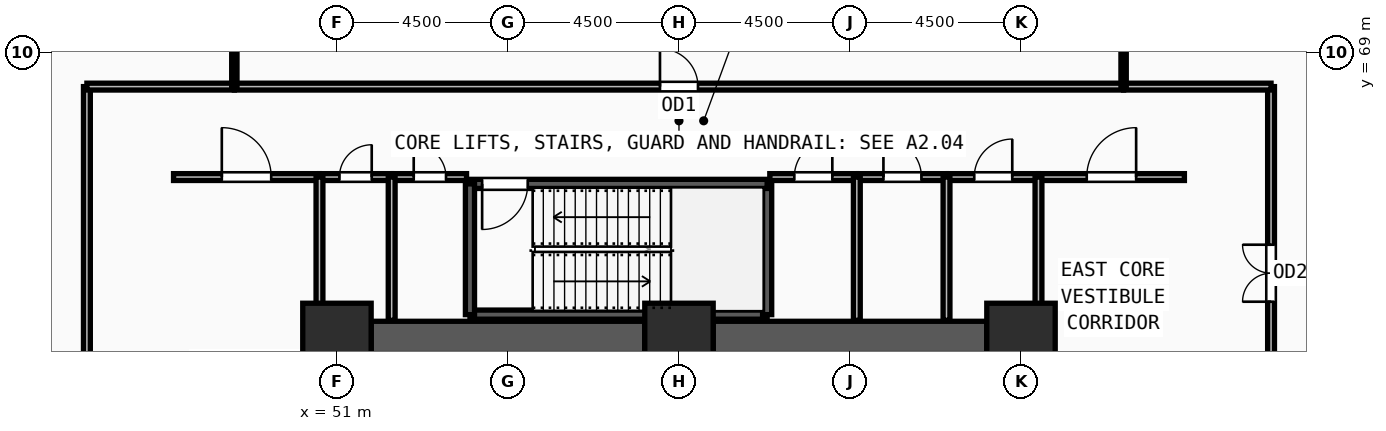
"""IFC4 building model, lengths in metres.
Left out: names, types, materials, properties, quantities, classifications, styles, units other than length and angle.
Written with IfcOpenShell. Run it as: python <this file> out.ifc"""

import sys

from ifc_helpers import new_model, si_unit, direction, frame, frame_2d, origin, origin_2d, place, context, subcontext, project, spatial, rectangle, extrude, source, transform, mapped, element, fill, save


model = new_model("IFC4")
c1 = context("Model", 3, precision=1e-05, world=origin(), true_north=direction((0.0, 1.0)))
c2 = subcontext(c1, "Body", "Model", "MODEL_VIEW")
j1 = project(units=[si_unit("LENGTHUNIT", "METRE"), si_unit("PLANEANGLEUNIT", "RADIAN")], contexts=[c1])
p1 = place(None, origin())
s1 = spatial("IfcSite", under=j1, at=p1, CompositionType="ELEMENT")
p2 = place(p1, origin())
s2 = spatial("IfcBuilding", under=s1, at=p2, CompositionType="ELEMENT")
p3 = place(p2, frame((0.0, 0.0, 9.9)))
s3 = spatial("IfcBuildingStorey", under=s2, at=p3, CompositionType="ELEMENT", Elevation=9.9)
m1 = source(origin(), c2, "Body", "SweptSolid", [
    extrude(rectangle(XDim=1.8, YDim=1.8, at=origin_2d()), origin(), (0.0, 0.0, 1.0), 4.5),
])
for number, where, z_axis, x_axis in (
    (1, (69.0, 61.5, 0.0), (0.0, 0.0, 1.0), (1.0, 0.0, 0.0)),
    (2, (60.0, 61.5, 0.0), (0.0, 0.0, 1.0), (1.0, 0.0, 0.0)),
    (3, (51.0, 61.5, 0.0), (0.0, 0.0, 1.0), (1.0, 0.0, 0.0)),
):
    element("IfcColumn", number, at=place(p3, frame(where, z_axis=z_axis, x_axis=x_axis)), inside=s3, PredefinedType="COLUMN", context=c2, shape_type="MappedRepresentation", body=[
        mapped(m1, transform((0.0, 0.0, 0.0), x_axis=(1.0, 0.0, 0.0), y_axis=(0.0, 1.0, 0.0), z_axis=(0.0, 0.0, 1.0), scale=1.0)),
    ])
for number, where, z_axis, x_axis in (
    (4, (51.9, 61.5, 0.0), (0.0, 0.0, 1.0), (1.0, 0.0, 0.0)),
    (5, (60.9, 61.5, 0.0), (0.0, 0.0, 1.0), (1.0, 0.0, 0.0)),
):
    element("IfcWall", number, at=place(p3, frame(where, z_axis=z_axis, x_axis=x_axis)), inside=s3, PredefinedType="SHEAR", context=c2, shape_type="SweptSolid", body=[
        extrude(rectangle(XDim=7.2, YDim=0.85, at=frame_2d((3.6, 0.0))), origin(), (0.0, 0.0, 1.0), 4.25),
    ])
p4 = place(p3, frame((54.5, 62.1, 0.0), z_axis=(0.0, 0.0, 1.0), x_axis=(1.0, 0.0, 0.0)))
e6 = element("IfcWall", 6, at=p4, inside=s3, PredefinedType="SOLIDWALL", context=c2, shape_type="SweptSolid", body=[
    extrude(rectangle(XDim=7.82, YDim=0.24, at=frame_2d((3.91, 0.0))), origin(), (0.0, 0.0, 1.0), 4.25),
])
p5 = place(p3, frame((62.32, 62.1, 0.0), z_axis=(0.0, 0.0, 1.0), x_axis=(0.0, 1.0, 0.0)))
e7 = element("IfcWall", 7, at=p5, inside=s3, PredefinedType="SOLIDWALL", context=c2, shape_type="SweptSolid", body=[
    extrude(rectangle(XDim=3.44, YDim=0.24, at=frame_2d((1.72, 0.0))), origin(), (0.0, 0.0, 1.0), 4.25),
])
p6 = place(p3, frame((62.32, 65.54, 0.0), z_axis=(0.0, 0.0, 1.0), x_axis=(-1.0, 0.0, 0.0)))
e8 = element("IfcWall", 8, at=p6, inside=s3, PredefinedType="SOLIDWALL", context=c2, shape_type="SweptSolid", body=[
    extrude(rectangle(XDim=7.82, YDim=0.24, at=frame_2d((3.91, 0.0))), origin(), (0.0, 0.0, 1.0), 4.25),
])
m2 = source(origin(), c2, "Body", "SweptSolid", [
    extrude(rectangle(XDim=1.2, YDim=2.2, at=frame_2d((0.6, 1.1))), frame((0.0, 0.13, 0.0), z_axis=(0.0, -1.0, 0.0), x_axis=(1.0, 0.0, 0.0)), (0.0, 0.0, 1.0), 0.26),
])
p7 = place(p6, frame((6.3, 0.0, 0.0)))
e9 = element("IfcOpeningElement", 9, at=p7, cuts=e8, PredefinedType="OPENING", context=c2, shape_type="MappedRepresentation", body=[
    mapped(m2, transform((0.0, 0.0, 0.0), x_axis=(1.0, 0.0, 0.0), y_axis=(0.0, 1.0, 0.0), z_axis=(0.0, 0.0, 1.0), scale=1.0)),
])
p8 = place(p3, frame((54.5, 65.54, 0.0), z_axis=(0.0, 0.0, 1.0), x_axis=(0.0, -1.0, 0.0)))
e10 = element("IfcWall", 10, at=p8, inside=s3, PredefinedType="SOLIDWALL", context=c2, shape_type="SweptSolid", body=[
    extrude(rectangle(XDim=3.44, YDim=0.24, at=frame_2d((1.72, 0.0))), origin(), (0.0, 0.0, 1.0), 4.25),
])
p9 = place(p3, frame((50.54, 65.72, 0.0), z_axis=(0.0, 0.0, 1.0), x_axis=(1.0, 0.0, 0.0)))
e11 = element("IfcWall", 11, at=p9, inside=s3, PredefinedType="PARTITIONING", context=c2, shape_type="SweptSolid", body=[
    extrude(rectangle(XDim=1.9, YDim=0.18, at=frame_2d((0.95, 0.0))), origin(), (0.0, 0.0, 1.0), 4.25),
])
m3 = source(origin(), c2, "Body", "SweptSolid", [
    extrude(rectangle(XDim=0.85, YDim=2.1, at=frame_2d((0.425, 1.05))), frame((0.0, 0.1, 0.0), z_axis=(0.0, -1.0, 0.0), x_axis=(1.0, 0.0, 0.0)), (0.0, 0.0, 1.0), 0.2),
])
p10 = place(p9, frame((0.525, 0.0, 0.0)))
e12 = element("IfcOpeningElement", 12, at=p10, cuts=e11, PredefinedType="OPENING", context=c2, shape_type="MappedRepresentation", body=[
    mapped(m3, transform((0.0, 0.0, 0.0), x_axis=(1.0, 0.0, 0.0), y_axis=(0.0, 1.0, 0.0), z_axis=(0.0, 0.0, 1.0), scale=1.0)),
])
p11 = place(p3, frame((52.48, 65.72, 0.0), z_axis=(0.0, 0.0, 1.0), x_axis=(1.0, 0.0, 0.0)))
e13 = element("IfcWall", 13, at=p11, inside=s3, PredefinedType="PARTITIONING", context=c2, shape_type="SweptSolid", body=[
    extrude(rectangle(XDim=1.93, YDim=0.18, at=frame_2d((0.965, 0.0))), origin(), (0.0, 0.0, 1.0), 4.25),
])
p12 = place(p11, frame((0.54, 0.0, 0.0)))
e14 = element("IfcOpeningElement", 14, at=p12, cuts=e13, PredefinedType="OPENING", context=c2, shape_type="MappedRepresentation", body=[
    mapped(m3, transform((0.0, 0.0, 0.0), x_axis=(1.0, 0.0, 0.0), y_axis=(0.0, 1.0, 0.0), z_axis=(0.0, 0.0, 1.0), scale=1.0)),
])
p13 = place(p3, frame((62.39, 65.72, 0.0), z_axis=(0.0, 0.0, 1.0), x_axis=(1.0, 0.0, 0.0)))
e15 = element("IfcWall", 15, at=p13, inside=s3, PredefinedType="PARTITIONING", context=c2, shape_type="SweptSolid", body=[
    extrude(rectangle(XDim=2.29, YDim=0.18, at=frame_2d((1.145, 0.0))), origin(), (0.0, 0.0, 1.0), 4.25),
])
m4 = source(origin(), c2, "Body", "SweptSolid", [
    extrude(rectangle(XDim=1.0, YDim=2.2, at=frame_2d((0.5, 1.1))), frame((0.0, 0.1, 0.0), z_axis=(0.0, -1.0, 0.0), x_axis=(1.0, 0.0, 0.0)), (0.0, 0.0, 1.0), 0.2),
])
p14 = place(p13, frame((0.645, 0.0, 0.0)))
e16 = element("IfcOpeningElement", 16, at=p14, cuts=e15, PredefinedType="OPENING", context=c2, shape_type="MappedRepresentation", body=[
    mapped(m4, transform((0.0, 0.0, 0.0), x_axis=(1.0, 0.0, 0.0), y_axis=(0.0, 1.0, 0.0), z_axis=(0.0, 0.0, 1.0), scale=1.0)),
])
p15 = place(p3, frame((64.72, 65.72, 0.0), z_axis=(0.0, 0.0, 1.0), x_axis=(1.0, 0.0, 0.0)))
e17 = element("IfcWall", 17, at=p15, inside=s3, PredefinedType="PARTITIONING", context=c2, shape_type="SweptSolid", body=[
    extrude(rectangle(XDim=2.32, YDim=0.18, at=frame_2d((1.16, 0.0))), origin(), (0.0, 0.0, 1.0), 4.25),
])
p16 = place(p15, frame((0.66, 0.0, 0.0)))
e18 = element("IfcOpeningElement", 18, at=p16, cuts=e17, PredefinedType="OPENING", context=c2, shape_type="MappedRepresentation", body=[
    mapped(m4, transform((0.0, 0.0, 0.0), x_axis=(1.0, 0.0, 0.0), y_axis=(0.0, 1.0, 0.0), z_axis=(0.0, 0.0, 1.0), scale=1.0)),
])
p17 = place(p3, frame((67.08, 65.72, 0.0), z_axis=(0.0, 0.0, 1.0), x_axis=(1.0, 0.0, 0.0)))
e19 = element("IfcWall", 19, at=p17, inside=s3, PredefinedType="PARTITIONING", context=c2, shape_type="SweptSolid", body=[
    extrude(rectangle(XDim=2.38, YDim=0.18, at=frame_2d((1.19, 0.0))), origin(), (0.0, 0.0, 1.0), 4.25),
])
p18 = place(p17, frame((0.69, 0.0, 0.0)))
e20 = element("IfcOpeningElement", 20, at=p18, cuts=e19, PredefinedType="OPENING", context=c2, shape_type="MappedRepresentation", body=[
    mapped(m4, transform((0.0, 0.0, 0.0), x_axis=(1.0, 0.0, 0.0), y_axis=(0.0, 1.0, 0.0), z_axis=(0.0, 0.0, 1.0), scale=1.0)),
])
p19 = place(p3, frame((46.7, 65.72, 0.0), z_axis=(0.0, 0.0, 1.0), x_axis=(1.0, 0.0, 0.0)))
e21 = element("IfcWall", 21, at=p19, inside=s3, PredefinedType="PARTITIONING", context=c2, shape_type="SweptSolid", body=[
    extrude(rectangle(XDim=3.84, YDim=0.18, at=frame_2d((1.92, 0.0))), origin(), (0.0, 0.0, 1.0), 4.25),
])
m5 = source(origin(), c2, "Body", "SweptSolid", [
    extrude(rectangle(XDim=1.3, YDim=2.2, at=frame_2d((0.65, 1.1))), frame((0.0, 0.1, 0.0), z_axis=(0.0, -1.0, 0.0), x_axis=(1.0, 0.0, 0.0)), (0.0, 0.0, 1.0), 0.2),
])
p20 = place(p19, frame((1.27, 0.0, 0.0)))
e22 = element("IfcOpeningElement", 22, at=p20, cuts=e21, PredefinedType="OPENING", context=c2, shape_type="MappedRepresentation", body=[
    mapped(m5, transform((0.0, 0.0, 0.0), x_axis=(1.0, 0.0, 0.0), y_axis=(0.0, 1.0, 0.0), z_axis=(0.0, 0.0, 1.0), scale=1.0)),
])
p21 = place(p3, frame((69.46, 65.72, 0.0), z_axis=(0.0, 0.0, 1.0), x_axis=(1.0, 0.0, 0.0)))
e23 = element("IfcWall", 23, at=p21, inside=s3, PredefinedType="PARTITIONING", context=c2, shape_type="SweptSolid", body=[
    extrude(rectangle(XDim=3.84, YDim=0.18, at=frame_2d((1.92, 0.0))), origin(), (0.0, 0.0, 1.0), 4.25),
])
p22 = place(p21, frame((1.27, 0.0, 0.0)))
e24 = element("IfcOpeningElement", 24, at=p22, cuts=e23, PredefinedType="OPENING", context=c2, shape_type="MappedRepresentation", body=[
    mapped(m5, transform((0.0, 0.0, 0.0), x_axis=(1.0, 0.0, 0.0), y_axis=(0.0, 1.0, 0.0), z_axis=(0.0, 0.0, 1.0), scale=1.0)),
])
p23 = place(p3, frame((44.42, 46.1, 0.0), z_axis=(0.0, 0.0, 1.0), x_axis=(0.0, 1.0, 0.0)))
e25 = element("IfcWall", 25, at=p23, inside=s3, PredefinedType="PARTITIONING", context=c2, shape_type="SweptSolid", body=[
    extrude(rectangle(XDim=22.0, YDim=0.18, at=frame_2d((11.0, 0.0))), origin(), (0.0, 0.0, 1.0), 4.25),
])
m6 = source(origin(), c2, "Body", "SweptSolid", [
    extrude(rectangle(XDim=1.5, YDim=2.2, at=frame_2d((0.75, 1.1))), frame((0.0, 0.1, 0.0), z_axis=(0.0, -1.0, 0.0), x_axis=(1.0, 0.0, 0.0)), (0.0, 0.0, 1.0), 0.2),
])
p24 = place(p23, frame((10.25, 0.0, 0.0)))
e26 = element("IfcOpeningElement", 26, at=p24, cuts=e25, PredefinedType="OPENING", context=c2, shape_type="MappedRepresentation", body=[
    mapped(m6, transform((0.0, 0.0, 0.0), x_axis=(1.0, 0.0, 0.0), y_axis=(0.0, 1.0, 0.0), z_axis=(0.0, 0.0, 1.0), scale=1.0)),
])
p25 = place(p3, frame((75.58, 58.28, 0.0), z_axis=(0.0, 0.0, 1.0), x_axis=(0.0, 1.0, 0.0)))
e27 = element("IfcWall", 27, at=p25, inside=s3, PredefinedType="PARTITIONING", context=c2, shape_type="SweptSolid", body=[
    extrude(rectangle(XDim=9.82, YDim=0.18, at=frame_2d((4.91, 0.0))), origin(), (0.0, 0.0, 1.0), 4.25),
])
p26 = place(p25, frame((4.16, 0.0, 0.0)))
e28 = element("IfcOpeningElement", 28, at=p26, cuts=e27, PredefinedType="OPENING", context=c2, shape_type="MappedRepresentation", body=[
    mapped(m6, transform((0.0, 0.0, 0.0), x_axis=(1.0, 0.0, 0.0), y_axis=(0.0, 1.0, 0.0), z_axis=(0.0, 0.0, 1.0), scale=1.0)),
])
p27 = place(p3, frame((48.3, 68.1, 0.0), z_axis=(0.0, 0.0, 1.0), x_axis=(1.0, 0.0, 0.0)))
e29 = element("IfcWall", 29, at=p27, inside=s3, PredefinedType="PARTITIONING", context=c2, shape_type="SweptSolid", body=[
    extrude(rectangle(XDim=23.4, YDim=0.18, at=frame_2d((11.7, 0.0))), origin(), (0.0, 0.0, 1.0), 4.25),
])
p28 = place(p27, frame((11.2, 0.0, 0.0)))
e30 = element("IfcOpeningElement", 30, at=p28, cuts=e29, PredefinedType="OPENING", context=c2, shape_type="MappedRepresentation", body=[
    mapped(m4, transform((0.0, 0.0, 0.0), x_axis=(1.0, 0.0, 0.0), y_axis=(0.0, 1.0, 0.0), z_axis=(0.0, 0.0, 1.0), scale=1.0)),
])
for number, where, z_axis, x_axis in (
    (31, (44.42, 68.1, 0.0), (0.0, 0.0, 1.0), (1.0, 0.0, 0.0)),
    (32, (71.7, 68.1, 0.0), (0.0, 0.0, 1.0), (1.0, 0.0, 0.0)),
):
    element("IfcWall", number, at=place(p3, frame(where, z_axis=z_axis, x_axis=x_axis)), inside=s3, PredefinedType="PARTITIONING", context=c2, shape_type="SweptSolid", body=[
        extrude(rectangle(XDim=3.88, YDim=0.18, at=frame_2d((1.94, 0.0))), origin(), (0.0, 0.0, 1.0), 4.25),
    ])
for number, where, z_axis, x_axis in (
    (33, (48.3, 68.1, 0.0), (0.0, 0.0, 1.0), (0.0, 1.0, 0.0)),
    (34, (71.7, 68.1, 0.0), (0.0, 0.0, 1.0), (0.0, 1.0, 0.0)),
):
    element("IfcWall", number, at=place(p3, frame(where, z_axis=z_axis, x_axis=x_axis)), inside=s3, PredefinedType="PARTITIONING", context=c2, shape_type="SweptSolid", body=[
        extrude(rectangle(XDim=18.675, YDim=0.14, at=frame_2d((9.337, 0.0))), origin(), (0.0, 0.0, 1.0), 4.25),
    ])
for number, where, z_axis, x_axis in (
    (35, (50.54, 61.95, 0.0), (0.0, 0.0, 1.0), (0.0, 1.0, 0.0)),
    (36, (52.44, 61.95, 0.0), (0.0, 0.0, 1.0), (0.0, 1.0, 0.0)),
    (37, (64.68, 61.95, 0.0), (0.0, 0.0, 1.0), (0.0, 1.0, 0.0)),
    (38, (67.04, 61.95, 0.0), (0.0, 0.0, 1.0), (0.0, 1.0, 0.0)),
    (39, (69.46, 61.95, 0.0), (0.0, 0.0, 1.0), (0.0, 1.0, 0.0)),
):
    element("IfcWall", number, at=place(p3, frame(where, z_axis=z_axis, x_axis=x_axis)), inside=s3, PredefinedType="PARTITIONING", context=c2, shape_type="SweptSolid", body=[
        extrude(rectangle(XDim=3.77, YDim=0.18, at=frame_2d((1.885, 0.0))), origin(), (0.0, 0.0, 1.0), 4.25),
    ])
m7 = source(origin(), c2, "Body", "SweptSolid", [
    extrude(rectangle(XDim=1.2, YDim=2.2, at=frame_2d((0.6, 1.1))), frame((0.0, 0.025, 0.0), z_axis=(0.0, -1.0, 0.0), x_axis=(1.0, 0.0, 0.0)), (0.0, 0.0, 1.0), 0.05),
])
p29 = place(p7, origin())
e40 = element("IfcDoor", 40, at=p29, inside=s3, OperationType="SINGLE_SWING_RIGHT", PredefinedType="DOOR", context=c2, shape_type="MappedRepresentation", body=[
    mapped(m7, transform((0.0, 0.0, 0.0), x_axis=(1.0, 0.0, 0.0), y_axis=(0.0, 1.0, 0.0), z_axis=(0.0, 0.0, 1.0), scale=1.0)),
])
fill(e9, e40)
m8 = source(origin(), c2, "Body", "SweptSolid", [
    extrude(rectangle(XDim=0.85, YDim=2.1, at=frame_2d((0.425, 1.05))), frame((0.0, 0.025, 0.0), z_axis=(0.0, -1.0, 0.0), x_axis=(1.0, 0.0, 0.0)), (0.0, 0.0, 1.0), 0.05),
])
p30 = place(p10, origin())
e41 = element("IfcDoor", 41, at=p30, inside=s3, OperationType="SINGLE_SWING_RIGHT", PredefinedType="DOOR", context=c2, shape_type="MappedRepresentation", body=[
    mapped(m8, transform((0.0, 0.0, 0.0), x_axis=(1.0, 0.0, 0.0), y_axis=(0.0, 1.0, 0.0), z_axis=(0.0, 0.0, 1.0), scale=1.0)),
])
fill(e12, e41)
p31 = place(p12, origin())
e42 = element("IfcDoor", 42, at=p31, inside=s3, OperationType="SINGLE_SWING_LEFT", PredefinedType="DOOR", context=c2, shape_type="MappedRepresentation", body=[
    mapped(m8, transform((0.0, 0.0, 0.0), x_axis=(1.0, 0.0, 0.0), y_axis=(0.0, 1.0, 0.0), z_axis=(0.0, 0.0, 1.0), scale=1.0)),
])
fill(e14, e42)
m9 = source(origin(), c2, "Body", "SweptSolid", [
    extrude(rectangle(XDim=1.0, YDim=2.2, at=frame_2d((0.5, 1.1))), frame((0.0, 0.025, 0.0), z_axis=(0.0, -1.0, 0.0), x_axis=(1.0, 0.0, 0.0)), (0.0, 0.0, 1.0), 0.05),
])
p32 = place(p14, origin())
e43 = element("IfcDoor", 43, at=p32, inside=s3, OperationType="SINGLE_SWING_RIGHT", PredefinedType="DOOR", context=c2, shape_type="MappedRepresentation", body=[
    mapped(m9, transform((0.0, 0.0, 0.0), x_axis=(1.0, 0.0, 0.0), y_axis=(0.0, 1.0, 0.0), z_axis=(0.0, 0.0, 1.0), scale=1.0)),
])
fill(e16, e43)
p33 = place(p16, origin())
e44 = element("IfcDoor", 44, at=p33, inside=s3, OperationType="SINGLE_SWING_LEFT", PredefinedType="DOOR", context=c2, shape_type="MappedRepresentation", body=[
    mapped(m9, transform((0.0, 0.0, 0.0), x_axis=(1.0, 0.0, 0.0), y_axis=(0.0, 1.0, 0.0), z_axis=(0.0, 0.0, 1.0), scale=1.0)),
])
fill(e18, e44)
p34 = place(p18, origin())
e45 = element("IfcDoor", 45, at=p34, inside=s3, OperationType="SINGLE_SWING_RIGHT", PredefinedType="DOOR", context=c2, shape_type="MappedRepresentation", body=[
    mapped(m9, transform((0.0, 0.0, 0.0), x_axis=(1.0, 0.0, 0.0), y_axis=(0.0, 1.0, 0.0), z_axis=(0.0, 0.0, 1.0), scale=1.0)),
])
fill(e20, e45)
m10 = source(origin(), c2, "Body", "SweptSolid", [
    extrude(rectangle(XDim=1.3, YDim=2.2, at=frame_2d((0.65, 1.1))), frame((0.0, 0.025, 0.0), z_axis=(0.0, -1.0, 0.0), x_axis=(1.0, 0.0, 0.0)), (0.0, 0.0, 1.0), 0.05),
])
p35 = place(p20, origin())
e46 = element("IfcDoor", 46, at=p35, inside=s3, OperationType="SINGLE_SWING_LEFT", PredefinedType="DOOR", context=c2, shape_type="MappedRepresentation", body=[
    mapped(m10, transform((0.0, 0.0, 0.0), x_axis=(1.0, 0.0, 0.0), y_axis=(0.0, 1.0, 0.0), z_axis=(0.0, 0.0, 1.0), scale=1.0)),
])
fill(e22, e46)
p36 = place(p22, origin())
e47 = element("IfcDoor", 47, at=p36, inside=s3, OperationType="SINGLE_SWING_RIGHT", PredefinedType="DOOR", context=c2, shape_type="MappedRepresentation", body=[
    mapped(m10, transform((0.0, 0.0, 0.0), x_axis=(1.0, 0.0, 0.0), y_axis=(0.0, 1.0, 0.0), z_axis=(0.0, 0.0, 1.0), scale=1.0)),
])
fill(e24, e47)
m11 = source(origin(), c2, "Body", "SweptSolid", [
    extrude(rectangle(XDim=1.5, YDim=2.2, at=frame_2d((0.75, 1.1))), frame((0.0, 0.025, 0.0), z_axis=(0.0, -1.0, 0.0), x_axis=(1.0, 0.0, 0.0)), (0.0, 0.0, 1.0), 0.05),
])
p37 = place(p26, origin())
e48 = element("IfcDoor", 48, at=p37, inside=s3, OperationType="DOUBLE_DOOR_SINGLE_SWING", PredefinedType="DOOR", context=c2, shape_type="MappedRepresentation", body=[
    mapped(m11, transform((0.0, 0.0, 0.0), x_axis=(1.0, 0.0, 0.0), y_axis=(0.0, 1.0, 0.0), z_axis=(0.0, 0.0, 1.0), scale=1.0)),
])
fill(e28, e48)
p38 = place(p28, origin())
e49 = element("IfcDoor", 49, at=p38, inside=s3, OperationType="SINGLE_SWING_LEFT", PredefinedType="DOOR", context=c2, shape_type="MappedRepresentation", body=[
    mapped(m9, transform((0.0, 0.0, 0.0), x_axis=(1.0, 0.0, 0.0), y_axis=(0.0, 1.0, 0.0), z_axis=(0.0, 0.0, 1.0), scale=1.0)),
])
fill(e30, e49)
save(model, sys.argv[1])
